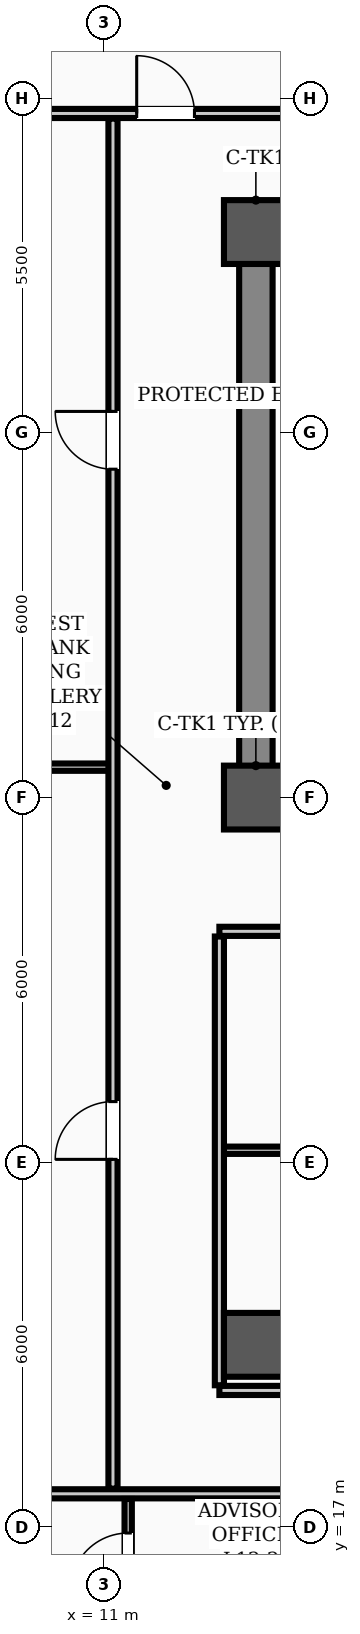
"""IFC4 building model, lengths in metres.
Left out: names, types, materials, properties, quantities, classifications, styles, units other than length and angle.
Written with IfcOpenShell. Run it as: python <this file> out.ifc"""

import sys

from ifc_helpers import new_model, si_unit, direction, frame, frame_2d, origin, origin_2d, place, context, subcontext, project, spatial, rectangle, hollow_rectangle, extrude, element, fill, save


model = new_model("IFC4")
c1 = context("Model", 3, precision=1e-05, world=origin(), true_north=direction((0.0, 1.0)))
c2 = subcontext(c1, "Body", "Model", "MODEL_VIEW")
j1 = project(units=[si_unit("LENGTHUNIT", "METRE"), si_unit("PLANEANGLEUNIT", "RADIAN")], contexts=[c1])
p1 = place(None, origin())
s1 = spatial("IfcSite", under=j1, at=p1, CompositionType="ELEMENT")
p2 = place(p1, origin())
s2 = spatial("IfcBuilding", under=s1, at=p2, CompositionType="ELEMENT")
p3 = place(p2, frame((0.0, 0.0, 49.9)))
s3 = spatial("IfcBuildingStorey", under=s2, at=p3, CompositionType="ELEMENT", Elevation=49.9)
for number, where, z_axis, x_axis in (
    (1, (13.5, 29.0, 0.0), (0.0, 0.0, 1.0), (1.0, 0.0, 0.0)),
    (2, (13.5, 38.3, 0.0), (0.0, 0.0, 1.0), (1.0, 0.0, 0.0)),
    (3, (13.5, 20.0, 0.0), (0.0, 0.0, 1.0), (1.0, 0.0, 0.0)),
):
    element("IfcColumn", number, at=place(p3, frame(where, z_axis=z_axis, x_axis=x_axis)), inside=s3, PredefinedType="COLUMN", context=c2, shape_type="SweptSolid", body=[
        extrude(hollow_rectangle(XDim=1.05, YDim=1.05, WallThickness=0.038, InnerFilletRadius=0.019, OuterFilletRadius=0.057, at=origin_2d()), origin(), (0.0, 0.0, 1.0), 3.9),
    ])
p4 = place(p3, frame((13.5, 29.0, 0.0), z_axis=(0.0, 0.0, 1.0), x_axis=(1.0, 0.0, 0.0)))
e4 = element("IfcWall", 4, at=p4, inside=s3, PredefinedType="SHEAR", context=c2, shape_type="SweptSolid", body=[
    extrude(rectangle(XDim=30.5, YDim=0.55, at=frame_2d((15.25, 0.0))), origin(), (0.0, 0.0, 1.0), 3.66),
])
p5 = place(p4, frame((1.75, 0.0, 0.0)))
e5 = element("IfcOpeningElement", 5, at=p5, cuts=e4, PredefinedType="OPENING", context=c2, shape_type="SweptSolid", body=[
    extrude(rectangle(XDim=1.1, YDim=2.08, at=frame_2d((0.55, 1.04))), frame((0.0, 0.285, 0.0), z_axis=(0.0, -1.0, 0.0), x_axis=(1.0, 0.0, 0.0)), (0.0, 0.0, 1.0), 0.57),
])
p6 = place(p4, frame((26.7, 0.0, 0.0)))
e6 = element("IfcOpeningElement", 6, at=p6, cuts=e4, PredefinedType="OPENING", context=c2, shape_type="SweptSolid", body=[
    extrude(rectangle(XDim=1.1, YDim=2.08, at=frame_2d((0.55, 1.04))), frame((0.0, 0.285, 0.0), z_axis=(0.0, -1.0, 0.0), x_axis=(1.0, 0.0, 0.0)), (0.0, 0.0, 1.0), 0.57),
])
p7 = place(p4, frame((6.8, 0.0, 0.0)))
e7 = element("IfcOpeningElement", 7, at=p7, cuts=e4, PredefinedType="OPENING", context=c2, shape_type="SweptSolid", body=[
    extrude(rectangle(XDim=1.1, YDim=2.08, at=frame_2d((0.55, 1.04))), frame((0.0, 0.285, 0.0), z_axis=(0.0, -1.0, 0.0), x_axis=(1.0, 0.0, 0.0)), (0.0, 0.0, 1.0), 0.57),
])
p8 = place(p4, frame((13.2, 0.0, 0.0)))
e8 = element("IfcOpeningElement", 8, at=p8, cuts=e4, PredefinedType="OPENING", context=c2, shape_type="SweptSolid", body=[
    extrude(rectangle(XDim=1.6, YDim=2.08, at=frame_2d((0.8, 1.04))), frame((0.0, 0.285, 0.0), z_axis=(0.0, -1.0, 0.0), x_axis=(1.0, 0.0, 0.0)), (0.0, 0.0, 1.0), 0.57),
])
p9 = place(p4, frame((19.53, 0.0, 0.0)))
e9 = element("IfcOpeningElement", 9, at=p9, cuts=e4, PredefinedType="OPENING", context=c2, shape_type="SweptSolid", body=[
    extrude(rectangle(XDim=0.9, YDim=2.08, at=frame_2d((0.45, 1.04))), frame((0.0, 0.285, 0.0), z_axis=(0.0, -1.0, 0.0), x_axis=(1.0, 0.0, 0.0)), (0.0, 0.0, 1.0), 0.57),
])
p10 = place(p4, frame((21.57, 0.0, 0.0)))
e10 = element("IfcOpeningElement", 10, at=p10, cuts=e4, PredefinedType="OPENING", context=c2, shape_type="SweptSolid", body=[
    extrude(rectangle(XDim=0.9, YDim=2.08, at=frame_2d((0.45, 1.04))), frame((0.0, 0.285, 0.0), z_axis=(0.0, -1.0, 0.0), x_axis=(1.0, 0.0, 0.0)), (0.0, 0.0, 1.0), 0.57),
])
p11 = place(p3, frame((13.5, 38.3, 0.0), z_axis=(0.0, 0.0, 1.0), x_axis=(1.0, 0.0, 0.0)))
e11 = element("IfcWall", 11, at=p11, inside=s3, PredefinedType="SHEAR", context=c2, shape_type="SweptSolid", body=[
    extrude(rectangle(XDim=30.5, YDim=0.55, at=frame_2d((15.25, 0.0))), origin(), (0.0, 0.0, 1.0), 3.66),
])
p12 = place(p3, frame((13.5, 29.35, 0.0), z_axis=(0.0, 0.0, 1.0), x_axis=(0.0, 1.0, 0.0)))
e12 = element("IfcWall", 12, at=p12, inside=s3, PredefinedType="SHEAR", context=c2, shape_type="SweptSolid", body=[
    extrude(rectangle(XDim=8.6, YDim=0.55, at=frame_2d((4.3, 0.0))), origin(), (0.0, 0.0, 1.0), 3.66),
])
p13 = place(p3, frame((12.9, 26.8, 0.0), z_axis=(0.0, 0.0, 1.0), x_axis=(1.0, 0.0, 0.0)))
e13 = element("IfcWall", 13, at=p13, inside=s3, PredefinedType="PARTITIONING", context=c2, shape_type="SweptSolid", body=[
    extrude(rectangle(XDim=31.7, YDim=0.15, at=frame_2d((15.85, 0.0))), origin(), (0.0, 0.0, 1.0), 2.24),
])
p14 = place(p13, frame((13.6, 0.0, 0.0)))
e14 = element("IfcOpeningElement", 14, at=p14, cuts=e13, PredefinedType="OPENING", context=c2, shape_type="SweptSolid", body=[
    extrude(rectangle(XDim=1.6, YDim=2.08, at=frame_2d((0.8, 1.04))), frame((0.0, 0.085, 0.0), z_axis=(0.0, -1.0, 0.0), x_axis=(1.0, 0.0, 0.0)), (0.0, 0.0, 1.0), 0.17),
])
p15 = place(p13, frame((2.175, 0.0, 0.0)))
e15 = element("IfcOpeningElement", 15, at=p15, cuts=e13, PredefinedType="OPENING", context=c2, shape_type="SweptSolid", body=[
    extrude(rectangle(XDim=0.95, YDim=2.08, at=frame_2d((0.475, 1.04))), frame((0.0, 0.085, 0.0), z_axis=(0.0, -1.0, 0.0), x_axis=(1.0, 0.0, 0.0)), (0.0, 0.0, 1.0), 0.17),
])
p16 = place(p13, frame((6.925, 0.0, 0.0)))
e16 = element("IfcOpeningElement", 16, at=p16, cuts=e13, PredefinedType="OPENING", context=c2, shape_type="SweptSolid", body=[
    extrude(rectangle(XDim=0.95, YDim=2.08, at=frame_2d((0.475, 1.04))), frame((0.0, 0.085, 0.0), z_axis=(0.0, -1.0, 0.0), x_axis=(1.0, 0.0, 0.0)), (0.0, 0.0, 1.0), 0.17),
])
p17 = place(p13, frame((10.925, 0.0, 0.0)))
e17 = element("IfcOpeningElement", 17, at=p17, cuts=e13, PredefinedType="OPENING", context=c2, shape_type="SweptSolid", body=[
    extrude(rectangle(XDim=0.95, YDim=2.08, at=frame_2d((0.475, 1.04))), frame((0.0, 0.085, 0.0), z_axis=(0.0, -1.0, 0.0), x_axis=(1.0, 0.0, 0.0)), (0.0, 0.0, 1.0), 0.17),
])
p18 = place(p13, frame((16.025, 0.0, 0.0)))
e18 = element("IfcOpeningElement", 18, at=p18, cuts=e13, PredefinedType="OPENING", context=c2, shape_type="SweptSolid", body=[
    extrude(rectangle(XDim=0.95, YDim=2.08, at=frame_2d((0.475, 1.04))), frame((0.0, 0.085, 0.0), z_axis=(0.0, -1.0, 0.0), x_axis=(1.0, 0.0, 0.0)), (0.0, 0.0, 1.0), 0.17),
])
p19 = place(p13, frame((21.725, 0.0, 0.0)))
e19 = element("IfcOpeningElement", 19, at=p19, cuts=e13, PredefinedType="OPENING", context=c2, shape_type="SweptSolid", body=[
    extrude(rectangle(XDim=0.95, YDim=2.08, at=frame_2d((0.475, 1.04))), frame((0.0, 0.085, 0.0), z_axis=(0.0, -1.0, 0.0), x_axis=(1.0, 0.0, 0.0)), (0.0, 0.0, 1.0), 0.17),
])
p20 = place(p13, frame((27.925, 0.0, 0.0)))
e20 = element("IfcOpeningElement", 20, at=p20, cuts=e13, PredefinedType="OPENING", context=c2, shape_type="SweptSolid", body=[
    extrude(rectangle(XDim=0.95, YDim=2.08, at=frame_2d((0.475, 1.04))), frame((0.0, 0.085, 0.0), z_axis=(0.0, -1.0, 0.0), x_axis=(1.0, 0.0, 0.0)), (0.0, 0.0, 1.0), 0.17),
])
p21 = place(p3, frame((4.66, 17.55, 0.0), z_axis=(0.0, 0.0, 1.0), x_axis=(1.0, 0.0, 0.0)))
e21 = element("IfcWall", 21, at=p21, inside=s3, PredefinedType="PARTITIONING", context=c2, shape_type="SweptSolid", body=[
    extrude(rectangle(XDim=44.68, YDim=0.15, at=frame_2d((22.34, 0.0))), origin(), (0.0, 0.0, 1.0), 2.24),
])
p22 = place(p21, frame((10.565, 0.0, 0.0)))
e22 = element("IfcOpeningElement", 22, at=p22, cuts=e21, PredefinedType="OPENING", context=c2, shape_type="SweptSolid", body=[
    extrude(rectangle(XDim=0.95, YDim=2.08, at=frame_2d((0.475, 1.04))), frame((0.0, 0.085, 0.0), z_axis=(0.0, -1.0, 0.0), x_axis=(1.0, 0.0, 0.0)), (0.0, 0.0, 1.0), 0.17),
])
p23 = place(p21, frame((16.165, 0.0, 0.0)))
e23 = element("IfcOpeningElement", 23, at=p23, cuts=e21, PredefinedType="OPENING", context=c2, shape_type="SweptSolid", body=[
    extrude(rectangle(XDim=0.95, YDim=2.08, at=frame_2d((0.475, 1.04))), frame((0.0, 0.085, 0.0), z_axis=(0.0, -1.0, 0.0), x_axis=(1.0, 0.0, 0.0)), (0.0, 0.0, 1.0), 0.17),
])
p24 = place(p21, frame((30.565, 0.0, 0.0)))
e24 = element("IfcOpeningElement", 24, at=p24, cuts=e21, PredefinedType="OPENING", context=c2, shape_type="SweptSolid", body=[
    extrude(rectangle(XDim=0.95, YDim=2.08, at=frame_2d((0.475, 1.04))), frame((0.0, 0.085, 0.0), z_axis=(0.0, -1.0, 0.0), x_axis=(1.0, 0.0, 0.0)), (0.0, 0.0, 1.0), 0.17),
])
p25 = place(p21, frame((37.365, 0.0, 0.0)))
e25 = element("IfcOpeningElement", 25, at=p25, cuts=e21, PredefinedType="OPENING", context=c2, shape_type="SweptSolid", body=[
    extrude(rectangle(XDim=0.95, YDim=2.08, at=frame_2d((0.475, 1.04))), frame((0.0, 0.085, 0.0), z_axis=(0.0, -1.0, 0.0), x_axis=(1.0, 0.0, 0.0)), (0.0, 0.0, 1.0), 0.17),
])
p26 = place(p3, frame((12.9, 19.25, 0.0), z_axis=(0.0, 0.0, 1.0), x_axis=(1.0, 0.0, 0.0)))
e26 = element("IfcWall", 26, at=p26, inside=s3, PredefinedType="PARTITIONING", context=c2, shape_type="SweptSolid", body=[
    extrude(rectangle(XDim=13.3, YDim=0.15, at=frame_2d((6.65, 0.0))), origin(), (0.0, 0.0, 1.0), 2.24),
])
p27 = place(p26, frame((2.175, 0.0, 0.0)))
e27 = element("IfcOpeningElement", 27, at=p27, cuts=e26, PredefinedType="OPENING", context=c2, shape_type="SweptSolid", body=[
    extrude(rectangle(XDim=0.95, YDim=2.08, at=frame_2d((0.475, 1.04))), frame((0.0, 0.085, 0.0), z_axis=(0.0, -1.0, 0.0), x_axis=(1.0, 0.0, 0.0)), (0.0, 0.0, 1.0), 0.17),
])
p28 = place(p26, frame((6.925, 0.0, 0.0)))
e28 = element("IfcOpeningElement", 28, at=p28, cuts=e26, PredefinedType="OPENING", context=c2, shape_type="SweptSolid", body=[
    extrude(rectangle(XDim=0.95, YDim=2.08, at=frame_2d((0.475, 1.04))), frame((0.0, 0.085, 0.0), z_axis=(0.0, -1.0, 0.0), x_axis=(1.0, 0.0, 0.0)), (0.0, 0.0, 1.0), 0.17),
])
p29 = place(p26, frame((12.19, 0.0, 0.0)))
e29 = element("IfcOpeningElement", 29, at=p29, cuts=e26, PredefinedType="OPENING", context=c2, shape_type="SweptSolid", body=[
    extrude(rectangle(XDim=0.95, YDim=2.08, at=frame_2d((0.475, 1.04))), frame((0.0, 0.085, 0.0), z_axis=(0.0, -1.0, 0.0), x_axis=(1.0, 0.0, 0.0)), (0.0, 0.0, 1.0), 0.17),
])
p30 = place(p3, frame((12.9, 23.2, 0.0), z_axis=(0.0, 0.0, 1.0), x_axis=(1.0, 0.0, 0.0)))
e30 = element("IfcWall", 30, at=p30, inside=s3, PredefinedType="PARTITIONING", context=c2, shape_type="SweptSolid", body=[
    extrude(rectangle(XDim=5.3, YDim=0.12, at=frame_2d((2.65, 0.0))), origin(), (0.0, 0.0, 1.0), 2.24),
])
p31 = place(p3, frame((2.31, 29.5, 0.0), z_axis=(0.0, 0.0, 1.0), x_axis=(1.0, 0.0, 0.0)))
e31 = element("IfcWall", 31, at=p31, inside=s3, PredefinedType="PARTITIONING", context=c2, shape_type="SweptSolid", body=[
    extrude(rectangle(XDim=8.84, YDim=0.12, at=frame_2d((4.42, 0.0))), origin(), (0.0, 0.0, 1.0), 2.24),
])
p32 = place(p3, frame((2.31, 40.25, 0.0), z_axis=(0.0, 0.0, 1.0), x_axis=(1.0, 0.0, 0.0)))
e32 = element("IfcWall", 32, at=p32, inside=s3, PredefinedType="PARTITIONING", context=c2, shape_type="SweptSolid", body=[
    extrude(rectangle(XDim=49.38, YDim=0.15, at=frame_2d((24.69, 0.0))), origin(), (0.0, 0.0, 1.0), 2.24),
])
p33 = place(p32, frame((9.23, 0.0, 0.0)))
e33 = element("IfcOpeningElement", 33, at=p33, cuts=e32, PredefinedType="OPENING", context=c2, shape_type="SweptSolid", body=[
    extrude(rectangle(XDim=0.95, YDim=2.08, at=frame_2d((0.475, 1.04))), frame((0.0, 0.085, 0.0), z_axis=(0.0, -1.0, 0.0), x_axis=(1.0, 0.0, 0.0)), (0.0, 0.0, 1.0), 0.17),
])
p34 = place(p32, frame((17.215, 0.0, 0.0)))
e34 = element("IfcOpeningElement", 34, at=p34, cuts=e32, PredefinedType="OPENING", context=c2, shape_type="SweptSolid", body=[
    extrude(rectangle(XDim=0.95, YDim=2.08, at=frame_2d((0.475, 1.04))), frame((0.0, 0.085, 0.0), z_axis=(0.0, -1.0, 0.0), x_axis=(1.0, 0.0, 0.0)), (0.0, 0.0, 1.0), 0.17),
])
p35 = place(p32, frame((24.915, 0.0, 0.0)))
e35 = element("IfcOpeningElement", 35, at=p35, cuts=e32, PredefinedType="OPENING", context=c2, shape_type="SweptSolid", body=[
    extrude(rectangle(XDim=0.95, YDim=2.08, at=frame_2d((0.475, 1.04))), frame((0.0, 0.085, 0.0), z_axis=(0.0, -1.0, 0.0), x_axis=(1.0, 0.0, 0.0)), (0.0, 0.0, 1.0), 0.17),
])
p36 = place(p32, frame((32.815, 0.0, 0.0)))
e36 = element("IfcOpeningElement", 36, at=p36, cuts=e32, PredefinedType="OPENING", context=c2, shape_type="SweptSolid", body=[
    extrude(rectangle(XDim=0.95, YDim=2.08, at=frame_2d((0.475, 1.04))), frame((0.0, 0.085, 0.0), z_axis=(0.0, -1.0, 0.0), x_axis=(1.0, 0.0, 0.0)), (0.0, 0.0, 1.0), 0.17),
])
p37 = place(p32, frame((42.7, 0.0, 0.0)))
e37 = element("IfcOpeningElement", 37, at=p37, cuts=e32, PredefinedType="OPENING", context=c2, shape_type="SweptSolid", body=[
    extrude(rectangle(XDim=0.95, YDim=2.08, at=frame_2d((0.475, 1.04))), frame((0.0, 0.085, 0.0), z_axis=(0.0, -1.0, 0.0), x_axis=(1.0, 0.0, 0.0)), (0.0, 0.0, 1.0), 0.17),
])
p38 = place(p3, frame((11.15, 17.635, 0.0), z_axis=(0.0, 0.0, 1.0), x_axis=(0.0, 1.0, 0.0)))
e38 = element("IfcWall", 38, at=p38, inside=s3, PredefinedType="PARTITIONING", context=c2, shape_type="SweptSolid", body=[
    extrude(rectangle(XDim=22.53, YDim=0.15, at=frame_2d((11.265, 0.0))), origin(), (0.0, 0.0, 1.0), 2.24),
])
p39 = place(p38, frame((5.415, 0.0, 0.0)))
e39 = element("IfcOpeningElement", 39, at=p39, cuts=e38, PredefinedType="OPENING", context=c2, shape_type="SweptSolid", body=[
    extrude(rectangle(XDim=0.95, YDim=2.08, at=frame_2d((0.475, 1.04))), frame((0.0, 0.085, 0.0), z_axis=(0.0, -1.0, 0.0), x_axis=(1.0, 0.0, 0.0)), (0.0, 0.0, 1.0), 0.17),
])
p40 = place(p38, frame((16.765, 0.0, 0.0)))
e40 = element("IfcOpeningElement", 40, at=p40, cuts=e38, PredefinedType="OPENING", context=c2, shape_type="SweptSolid", body=[
    extrude(rectangle(XDim=0.95, YDim=2.08, at=frame_2d((0.475, 1.04))), frame((0.0, 0.085, 0.0), z_axis=(0.0, -1.0, 0.0), x_axis=(1.0, 0.0, 0.0)), (0.0, 0.0, 1.0), 0.17),
])
p41 = place(p3, frame((12.9, 19.335, 0.0), z_axis=(0.0, 0.0, 1.0), x_axis=(0.0, 1.0, 0.0)))
e41 = element("IfcWall", 41, at=p41, inside=s3, PredefinedType="PARTITIONING", context=c2, shape_type="SweptSolid", body=[
    extrude(rectangle(XDim=7.38, YDim=0.15, at=frame_2d((3.69, 0.0))), origin(), (0.0, 0.0, 1.0), 2.24),
])
p42 = place(p3, frame((11.4, 15.31, 0.0), z_axis=(0.0, 0.0, 1.0), x_axis=(0.0, 1.0, 0.0)))
e42 = element("IfcWall", 42, at=p42, inside=s3, PredefinedType="PARTITIONING", context=c2, shape_type="SweptSolid", body=[
    extrude(rectangle(XDim=2.155, YDim=0.12, at=frame_2d((1.078, 0.0))), origin(), (0.0, 0.0, 1.0), 3.66),
])
p43 = place(p42, frame((0.645, 0.0, 0.0)))
e43 = element("IfcOpeningElement", 43, at=p43, cuts=e42, PredefinedType="OPENING", context=c2, shape_type="SweptSolid", body=[
    extrude(rectangle(XDim=0.95, YDim=2.08, at=frame_2d((0.475, 1.04))), frame((0.0, 0.07, 0.0), z_axis=(0.0, -1.0, 0.0), x_axis=(1.0, 0.0, 0.0)), (0.0, 0.0, 1.0), 0.14),
])
p44 = place(p43, origin())
e44 = element("IfcDoor", 44, at=p44, inside=s3, OperationType="SINGLE_SWING_LEFT", PredefinedType="DOOR", context=c2, shape_type="SweptSolid", body=[
    extrude(rectangle(XDim=0.95, YDim=2.08, at=frame_2d((0.475, 1.04))), frame((0.0, 0.025, 0.0), z_axis=(0.0, -1.0, 0.0), x_axis=(1.0, 0.0, 0.0)), (0.0, 0.0, 1.0), 0.05),
])
fill(e43, e44)
p45 = place(p39, origin())
e45 = element("IfcDoor", 45, at=p45, inside=s3, OperationType="SINGLE_SWING_LEFT", PredefinedType="DOOR", context=c2, shape_type="SweptSolid", body=[
    extrude(rectangle(XDim=0.95, YDim=2.08, at=frame_2d((0.475, 1.04))), frame((0.0, 0.025, 0.0), z_axis=(0.0, -1.0, 0.0), x_axis=(1.0, 0.0, 0.0)), (0.0, 0.0, 1.0), 0.05),
])
fill(e39, e45)
p46 = place(p40, origin())
e46 = element("IfcDoor", 46, at=p46, inside=s3, OperationType="SINGLE_SWING_RIGHT", PredefinedType="DOOR", context=c2, shape_type="SweptSolid", body=[
    extrude(rectangle(XDim=0.95, YDim=2.08, at=frame_2d((0.475, 1.04))), frame((0.0, 0.025, 0.0), z_axis=(0.0, -1.0, 0.0), x_axis=(1.0, 0.0, 0.0)), (0.0, 0.0, 1.0), 0.05),
])
fill(e40, e46)
p47 = place(p33, origin())
e47 = element("IfcDoor", 47, at=p47, inside=s3, OperationType="SINGLE_SWING_LEFT", PredefinedType="DOOR", context=c2, shape_type="SweptSolid", body=[
    extrude(rectangle(XDim=0.95, YDim=2.08, at=frame_2d((0.475, 1.04))), frame((0.0, 0.025, 0.0), z_axis=(0.0, -1.0, 0.0), x_axis=(1.0, 0.0, 0.0)), (0.0, 0.0, 1.0), 0.05),
])
fill(e33, e47)
save(model, sys.argv[1])
